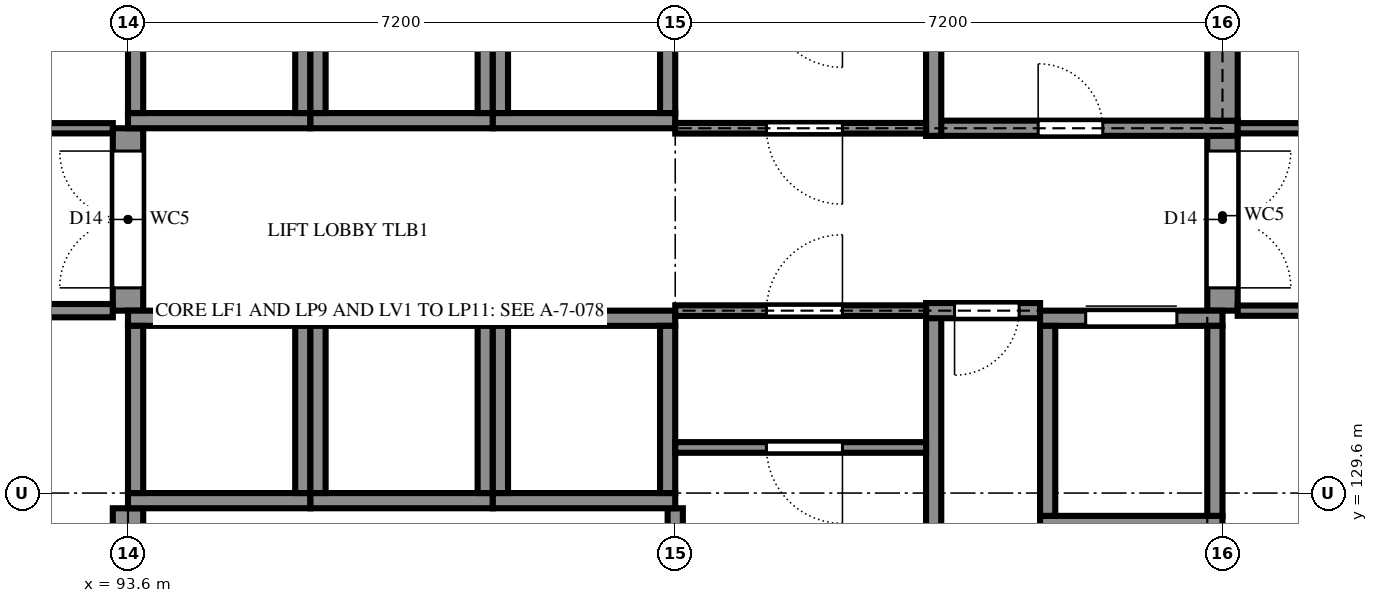
"""IFC4 building model, lengths in metres.
Left out: names, types, materials, properties, quantities, classifications, styles, units other than length and angle.
Written with IfcOpenShell. Run it as: python <this file> out.ifc"""

import sys

from ifc_helpers import new_model, si_unit, direction, frame, frame_2d, origin, place, context, subcontext, project, spatial, rectangle, extrude, element, fill, save


model = new_model("IFC4")
c1 = context("Model", 3, precision=1e-05, world=origin(), true_north=direction((0.0, 1.0)))
c2 = subcontext(c1, "Body", "Model", "MODEL_VIEW")
j1 = project(units=[si_unit("LENGTHUNIT", "METRE"), si_unit("PLANEANGLEUNIT", "RADIAN")], contexts=[c1])
p1 = place(None, origin())
s1 = spatial("IfcSite", under=j1, at=p1, CompositionType="ELEMENT")
p2 = place(p1, origin())
s2 = spatial("IfcBuilding", under=s1, at=p2, CompositionType="ELEMENT")
p3 = place(p2, frame((0.0, 0.0, 3.6)))
s3 = spatial("IfcBuildingStorey", under=s2, at=p3, CompositionType="ELEMENT", Elevation=3.6)
p4 = place(p3, frame((100.8, 128.575, 0.0), z_axis=(0.0, 0.0, 1.0), x_axis=(0.0, 1.0, 0.0)))
e1 = element("IfcWall", 1, at=p4, inside=s3, PredefinedType="SHEAR", context=c2, shape_type="SweptSolid", body=[
    extrude(rectangle(XDim=0.825, YDim=0.2, at=frame_2d((0.413, 0.0))), origin(), (0.0, 0.0, 1.0), 3.6),
])
p5 = place(p3, frame((93.6, 129.4, 0.0), z_axis=(0.0, 0.0, 1.0), x_axis=(0.0, -1.0, 0.0)))
e2 = element("IfcWall", 2, at=p5, inside=s3, PredefinedType="SHEAR", context=c2, shape_type="SweptSolid", body=[
    extrude(rectangle(XDim=7.1, YDim=0.4, at=frame_2d((3.55, 0.0))), origin(), (0.0, 0.0, 1.0), 3.6),
])
p6 = place(p3, frame((93.6, 132.0, 0.0), z_axis=(0.0, 0.0, 1.0), x_axis=(0.0, 1.0, 0.0)))
e3 = element("IfcWall", 3, at=p6, inside=s3, PredefinedType="SHEAR", context=c2, shape_type="SweptSolid", body=[
    extrude(rectangle(XDim=2.4, YDim=0.4, at=frame_2d((1.2, 0.0))), origin(), (0.0, 0.0, 1.0), 3.6),
])
p7 = place(p6, frame((0.3, 0.0, 0.0)))
e4 = element("IfcOpeningElement", 4, at=p7, cuts=e3, PredefinedType="OPENING", context=c2, shape_type="SweptSolid", body=[
    extrude(rectangle(XDim=1.8, YDim=2.1, at=frame_2d((0.9, 1.05))), frame((0.0, 0.21, 0.0), z_axis=(0.0, -1.0, 0.0), x_axis=(1.0, 0.0, 0.0)), (0.0, 0.0, 1.0), 0.42),
])
p8 = place(p3, frame((104.2, 132.1, 0.0), z_axis=(0.0, 0.0, 1.0), x_axis=(0.0, -1.0, 0.0)))
e5 = element("IfcWall", 5, at=p8, inside=s3, PredefinedType="SHEAR", context=c2, shape_type="SweptSolid", body=[
    extrude(rectangle(XDim=3.525, YDim=0.2, at=frame_2d((1.763, 0.0))), origin(), (0.0, 0.0, 1.0), 3.6),
])
p9 = place(p3, frame((105.6, 132.0, 0.0), z_axis=(0.0, 0.0, 1.0), x_axis=(-1.0, 0.0, 0.0)))
e6 = element("IfcWall", 6, at=p9, inside=s3, PredefinedType="SHEAR", context=c2, shape_type="SweptSolid", body=[
    extrude(rectangle(XDim=1.5, YDim=0.2, at=frame_2d((0.75, 0.0))), origin(), (0.0, 0.0, 1.0), 3.6),
])
p10 = place(p9, frame((0.275, 0.0, 0.0)))
e7 = element("IfcOpeningElement", 7, at=p10, cuts=e6, PredefinedType="OPENING", context=c2, shape_type="SweptSolid", body=[
    extrude(rectangle(XDim=0.85, YDim=2.1, at=frame_2d((0.425, 1.05))), frame((0.0, 0.11, 0.0), z_axis=(0.0, -1.0, 0.0), x_axis=(1.0, 0.0, 0.0)), (0.0, 0.0, 1.0), 0.22),
])
p11 = place(p3, frame((108.0, 132.0, 0.0), z_axis=(0.0, 0.0, 1.0), x_axis=(0.0, 1.0, 0.0)))
e8 = element("IfcWall", 8, at=p11, inside=s3, PredefinedType="SHEAR", context=c2, shape_type="SweptSolid", body=[
    extrude(rectangle(XDim=2.5, YDim=0.4, at=frame_2d((1.25, 0.0))), origin(), (0.0, 0.0, 1.0), 3.6),
])
p12 = place(p11, frame((0.3, 0.0, 0.0)))
e9 = element("IfcOpeningElement", 9, at=p12, cuts=e8, PredefinedType="OPENING", context=c2, shape_type="SweptSolid", body=[
    extrude(rectangle(XDim=1.8, YDim=2.1, at=frame_2d((0.9, 1.05))), frame((0.0, 0.21, 0.0), z_axis=(0.0, -1.0, 0.0), x_axis=(1.0, 0.0, 0.0)), (0.0, 0.0, 1.0), 0.42),
])
p13 = place(p3, frame((104.1, 134.4, 0.0), z_axis=(0.0, 0.0, 1.0), x_axis=(1.0, 0.0, 0.0)))
e10 = element("IfcWall", 10, at=p13, inside=s3, PredefinedType="SHEAR", context=c2, shape_type="SweptSolid", body=[
    extrude(rectangle(XDim=4.1, YDim=0.2, at=frame_2d((2.05, 0.0))), origin(), (0.0, 0.0, 1.0), 3.6),
])
p14 = place(p13, frame((1.475, 0.0, 0.0)))
e11 = element("IfcOpeningElement", 11, at=p14, cuts=e10, PredefinedType="OPENING", context=c2, shape_type="SweptSolid", body=[
    extrude(rectangle(XDim=0.85, YDim=2.1, at=frame_2d((0.425, 1.05))), frame((0.0, 0.11, 0.0), z_axis=(0.0, -1.0, 0.0), x_axis=(1.0, 0.0, 0.0)), (0.0, 0.0, 1.0), 0.22),
])
p15 = place(p3, frame((108.0, 134.5, 0.0), z_axis=(0.0, 0.0, 1.0), x_axis=(0.0, 1.0, 0.0)))
e12 = element("IfcWall", 12, at=p15, inside=s3, PredefinedType="SHEAR", context=c2, shape_type="SweptSolid", body=[
    extrude(rectangle(XDim=2.9, YDim=0.4, at=frame_2d((1.45, 0.0))), origin(), (0.0, 0.0, 1.0), 3.6),
])
p16 = place(p3, frame((104.2, 137.4, 0.0), z_axis=(0.0, 0.0, 1.0), x_axis=(0.0, -1.0, 0.0)))
e13 = element("IfcWall", 13, at=p16, inside=s3, PredefinedType="SHEAR", context=c2, shape_type="SweptSolid", body=[
    extrude(rectangle(XDim=3.1, YDim=0.2, at=frame_2d((1.55, 0.0))), origin(), (0.0, 0.0, 1.0), 3.6),
])
for number, where, z_axis, x_axis in (
    (14, (93.6, 129.5, 0.0), (0.0, 0.0, 1.0), (1.0, 0.0, 0.0)),
    (15, (93.6, 131.9, 0.0), (0.0, 0.0, 1.0), (1.0, 0.0, 0.0)),
):
    element("IfcWall", number, at=place(p3, frame(where, z_axis=z_axis, x_axis=x_axis)), inside=s3, PredefinedType="SHEAR", context=c2, shape_type="SweptSolid", body=[
        extrude(rectangle(XDim=2.4, YDim=0.2, at=frame_2d((1.2, 0.0))), origin(), (0.0, 0.0, 1.0), 3.6),
    ])
for number, where, z_axis, x_axis in (
    (16, (93.7, 129.6, 0.0), (0.0, 0.0, 1.0), (0.0, 1.0, 0.0)),
    (17, (95.9, 129.6, 0.0), (0.0, 0.0, 1.0), (0.0, 1.0, 0.0)),
):
    element("IfcWall", number, at=place(p3, frame(where, z_axis=z_axis, x_axis=x_axis)), inside=s3, PredefinedType="SHEAR", context=c2, shape_type="SweptSolid", body=[
        extrude(rectangle(XDim=2.2, YDim=0.2, at=frame_2d((1.1, 0.0))), origin(), (0.0, 0.0, 1.0), 3.6),
    ])
for number, where, z_axis, x_axis in (
    (18, (96.0, 129.5, 0.0), (0.0, 0.0, 1.0), (1.0, 0.0, 0.0)),
    (19, (96.0, 131.9, 0.0), (0.0, 0.0, 1.0), (1.0, 0.0, 0.0)),
):
    element("IfcWall", number, at=place(p3, frame(where, z_axis=z_axis, x_axis=x_axis)), inside=s3, PredefinedType="SHEAR", context=c2, shape_type="SweptSolid", body=[
        extrude(rectangle(XDim=2.4, YDim=0.2, at=frame_2d((1.2, 0.0))), origin(), (0.0, 0.0, 1.0), 3.6),
    ])
for number, where, z_axis, x_axis in (
    (20, (96.1, 129.6, 0.0), (0.0, 0.0, 1.0), (0.0, 1.0, 0.0)),
    (21, (98.3, 129.6, 0.0), (0.0, 0.0, 1.0), (0.0, 1.0, 0.0)),
):
    element("IfcWall", number, at=place(p3, frame(where, z_axis=z_axis, x_axis=x_axis)), inside=s3, PredefinedType="SHEAR", context=c2, shape_type="SweptSolid", body=[
        extrude(rectangle(XDim=2.2, YDim=0.2, at=frame_2d((1.1, 0.0))), origin(), (0.0, 0.0, 1.0), 3.6),
    ])
for number, where, z_axis, x_axis in (
    (22, (98.4, 129.5, 0.0), (0.0, 0.0, 1.0), (1.0, 0.0, 0.0)),
    (23, (98.4, 131.9, 0.0), (0.0, 0.0, 1.0), (1.0, 0.0, 0.0)),
):
    element("IfcWall", number, at=place(p3, frame(where, z_axis=z_axis, x_axis=x_axis)), inside=s3, PredefinedType="SHEAR", context=c2, shape_type="SweptSolid", body=[
        extrude(rectangle(XDim=2.4, YDim=0.2, at=frame_2d((1.2, 0.0))), origin(), (0.0, 0.0, 1.0), 3.6),
    ])
for number, where, z_axis, x_axis in (
    (24, (98.5, 129.6, 0.0), (0.0, 0.0, 1.0), (0.0, 1.0, 0.0)),
    (25, (100.7, 129.6, 0.0), (0.0, 0.0, 1.0), (0.0, 1.0, 0.0)),
):
    element("IfcWall", number, at=place(p3, frame(where, z_axis=z_axis, x_axis=x_axis)), inside=s3, PredefinedType="SHEAR", context=c2, shape_type="SweptSolid", body=[
        extrude(rectangle(XDim=2.2, YDim=0.2, at=frame_2d((1.1, 0.0))), origin(), (0.0, 0.0, 1.0), 3.6),
    ])
p17 = place(p3, frame((93.6, 134.5, 0.0), z_axis=(0.0, 0.0, 1.0), x_axis=(1.0, 0.0, 0.0)))
e26 = element("IfcWall", 26, at=p17, inside=s3, PredefinedType="SHEAR", context=c2, shape_type="SweptSolid", body=[
    extrude(rectangle(XDim=2.4, YDim=0.2, at=frame_2d((1.2, 0.0))), origin(), (0.0, 0.0, 1.0), 3.6),
])
for number, where, z_axis, x_axis in (
    (27, (93.7, 134.6, 0.0), (0.0, 0.0, 1.0), (0.0, 1.0, 0.0)),
    (28, (95.9, 134.6, 0.0), (0.0, 0.0, 1.0), (0.0, 1.0, 0.0)),
):
    element("IfcWall", number, at=place(p3, frame(where, z_axis=z_axis, x_axis=x_axis)), inside=s3, PredefinedType="SHEAR", context=c2, shape_type="SweptSolid", body=[
        extrude(rectangle(XDim=2.2, YDim=0.2, at=frame_2d((1.1, 0.0))), origin(), (0.0, 0.0, 1.0), 3.6),
    ])
p18 = place(p3, frame((96.0, 134.5, 0.0), z_axis=(0.0, 0.0, 1.0), x_axis=(1.0, 0.0, 0.0)))
e29 = element("IfcWall", 29, at=p18, inside=s3, PredefinedType="SHEAR", context=c2, shape_type="SweptSolid", body=[
    extrude(rectangle(XDim=2.4, YDim=0.2, at=frame_2d((1.2, 0.0))), origin(), (0.0, 0.0, 1.0), 3.6),
])
for number, where, z_axis, x_axis in (
    (30, (96.1, 134.6, 0.0), (0.0, 0.0, 1.0), (0.0, 1.0, 0.0)),
    (31, (98.3, 134.6, 0.0), (0.0, 0.0, 1.0), (0.0, 1.0, 0.0)),
):
    element("IfcWall", number, at=place(p3, frame(where, z_axis=z_axis, x_axis=x_axis)), inside=s3, PredefinedType="SHEAR", context=c2, shape_type="SweptSolid", body=[
        extrude(rectangle(XDim=2.2, YDim=0.2, at=frame_2d((1.1, 0.0))), origin(), (0.0, 0.0, 1.0), 3.6),
    ])
p19 = place(p3, frame((98.4, 134.5, 0.0), z_axis=(0.0, 0.0, 1.0), x_axis=(1.0, 0.0, 0.0)))
e32 = element("IfcWall", 32, at=p19, inside=s3, PredefinedType="SHEAR", context=c2, shape_type="SweptSolid", body=[
    extrude(rectangle(XDim=2.4, YDim=0.2, at=frame_2d((1.2, 0.0))), origin(), (0.0, 0.0, 1.0), 3.6),
])
for number, where, z_axis, x_axis in (
    (33, (98.5, 134.6, 0.0), (0.0, 0.0, 1.0), (0.0, 1.0, 0.0)),
    (34, (100.7, 134.6, 0.0), (0.0, 0.0, 1.0), (0.0, 1.0, 0.0)),
):
    element("IfcWall", number, at=place(p3, frame(where, z_axis=z_axis, x_axis=x_axis)), inside=s3, PredefinedType="SHEAR", context=c2, shape_type="SweptSolid", body=[
        extrude(rectangle(XDim=2.2, YDim=0.2, at=frame_2d((1.1, 0.0))), origin(), (0.0, 0.0, 1.0), 3.6),
    ])
p20 = place(p3, frame((105.6, 129.2, 0.0), z_axis=(0.0, 0.0, 1.0), x_axis=(1.0, 0.0, 0.0)))
e35 = element("IfcWall", 35, at=p20, inside=s3, PredefinedType="SHEAR", context=c2, shape_type="SweptSolid", body=[
    extrude(rectangle(XDim=2.4, YDim=0.2, at=frame_2d((1.2, 0.0))), origin(), (0.0, 0.0, 1.0), 3.6),
])
p21 = place(p3, frame((105.6, 131.9, 0.0), z_axis=(0.0, 0.0, 1.0), x_axis=(1.0, 0.0, 0.0)))
e36 = element("IfcWall", 36, at=p21, inside=s3, PredefinedType="SHEAR", context=c2, shape_type="SweptSolid", body=[
    extrude(rectangle(XDim=2.4, YDim=0.2, at=frame_2d((1.2, 0.0))), origin(), (0.0, 0.0, 1.0), 3.6),
])
p22 = place(p21, frame((0.6, 0.0, 0.0)))
e37 = element("IfcOpeningElement", 37, at=p22, cuts=e36, PredefinedType="OPENING", context=c2, shape_type="SweptSolid", body=[
    extrude(rectangle(XDim=1.2, YDim=2.1, at=frame_2d((0.6, 1.05))), frame((0.0, 0.11, 0.0), z_axis=(0.0, -1.0, 0.0), x_axis=(1.0, 0.0, 0.0)), (0.0, 0.0, 1.0), 0.22),
])
for number, where, z_axis, x_axis in (
    (38, (105.7, 129.3, 0.0), (0.0, 0.0, 1.0), (0.0, 1.0, 0.0)),
    (39, (107.9, 129.3, 0.0), (0.0, 0.0, 1.0), (0.0, 1.0, 0.0)),
):
    element("IfcWall", number, at=place(p3, frame(where, z_axis=z_axis, x_axis=x_axis)), inside=s3, PredefinedType="SHEAR", context=c2, shape_type="SweptSolid", body=[
        extrude(rectangle(XDim=2.5, YDim=0.2, at=frame_2d((1.25, 0.0))), origin(), (0.0, 0.0, 1.0), 3.6),
    ])
p23 = place(p3, frame((100.8, 130.2, 0.0), z_axis=(0.0, 0.0, 1.0), x_axis=(1.0, 0.0, 0.0)))
e40 = element("IfcWall", 40, at=p23, inside=s3, PredefinedType="PARTITIONING", context=c2, shape_type="SweptSolid", body=[
    extrude(rectangle(XDim=3.3, YDim=0.14, at=frame_2d((1.65, 0.0))), origin(), (0.0, 0.0, 1.0), 3.42),
])
p24 = place(p23, frame((1.2, 0.0, 0.0)))
e41 = element("IfcOpeningElement", 41, at=p24, cuts=e40, PredefinedType="OPENING", context=c2, shape_type="SweptSolid", body=[
    extrude(rectangle(XDim=1.0, YDim=2.1, at=frame_2d((0.5, 1.05))), frame((0.0, 0.08, 0.0), z_axis=(0.0, -1.0, 0.0), x_axis=(1.0, 0.0, 0.0)), (0.0, 0.0, 1.0), 0.16),
])
p25 = place(p3, frame((74.143, 132.0, 0.0), z_axis=(0.0, 0.0, 1.0), x_axis=(1.0, 0.0, 0.0)))
e42 = element("IfcWall", 42, at=p25, inside=s3, PredefinedType="PARTITIONING", context=c2, shape_type="SweptSolid", body=[
    extrude(rectangle(XDim=19.257, YDim=0.175, at=frame_2d((9.629, 0.0))), origin(), (0.0, 0.0, 1.0), 3.12),
])
p26 = place(p25, frame((9.357, 0.0, 0.0)))
e43 = element("IfcOpeningElement", 43, at=p26, cuts=e42, PredefinedType="OPENING", context=c2, shape_type="SweptSolid", body=[
    extrude(rectangle(XDim=1.0, YDim=2.4, at=frame_2d((0.5, 1.2))), frame((0.0, 0.097, 0.0), z_axis=(0.0, -1.0, 0.0), x_axis=(1.0, 0.0, 0.0)), (0.0, 0.0, 1.0), 0.195),
])
p27 = place(p3, frame((100.8, 132.0, 0.0), z_axis=(0.0, 0.0, 1.0), x_axis=(1.0, 0.0, 0.0)))
e44 = element("IfcWall", 44, at=p27, inside=s3, PredefinedType="PARTITIONING", context=c2, shape_type="SweptSolid", body=[
    extrude(rectangle(XDim=3.3, YDim=0.14, at=frame_2d((1.65, 0.0))), origin(), (0.0, 0.0, 1.0), 3.42),
])
p28 = place(p27, frame((1.2, 0.0, 0.0)))
e45 = element("IfcOpeningElement", 45, at=p28, cuts=e44, PredefinedType="OPENING", context=c2, shape_type="SweptSolid", body=[
    extrude(rectangle(XDim=1.0, YDim=2.1, at=frame_2d((0.5, 1.05))), frame((0.0, 0.08, 0.0), z_axis=(0.0, -1.0, 0.0), x_axis=(1.0, 0.0, 0.0)), (0.0, 0.0, 1.0), 0.16),
])
p29 = place(p3, frame((108.2, 132.0, 0.0), z_axis=(0.0, 0.0, 1.0), x_axis=(1.0, 0.0, 0.0)))
e46 = element("IfcWall", 46, at=p29, inside=s3, PredefinedType="PARTITIONING", context=c2, shape_type="SweptSolid", body=[
    extrude(rectangle(XDim=28.45, YDim=0.135, at=frame_2d((14.225, 0.0))), origin(), (0.0, 0.0, 1.0), 3.12),
])
p30 = place(p29, frame((5.3, 0.0, 0.0)))
e47 = element("IfcOpeningElement", 47, at=p30, cuts=e46, PredefinedType="OPENING", context=c2, shape_type="SweptSolid", body=[
    extrude(rectangle(XDim=1.0, YDim=2.4, at=frame_2d((0.5, 1.2))), frame((0.0, 0.077, 0.0), z_axis=(0.0, -1.0, 0.0), x_axis=(1.0, 0.0, 0.0)), (0.0, 0.0, 1.0), 0.155),
])
p31 = place(p29, frame((19.3, 0.0, 0.0)))
e48 = element("IfcOpeningElement", 48, at=p31, cuts=e46, PredefinedType="OPENING", context=c2, shape_type="SweptSolid", body=[
    extrude(rectangle(XDim=1.0, YDim=2.4, at=frame_2d((0.5, 1.2))), frame((0.0, 0.077, 0.0), z_axis=(0.0, -1.0, 0.0), x_axis=(1.0, 0.0, 0.0)), (0.0, 0.0, 1.0), 0.155),
])
p32 = place(p3, frame((64.95, 134.4, 0.0), z_axis=(0.0, 0.0, 1.0), x_axis=(1.0, 0.0, 0.0)))
e49 = element("IfcWall", 49, at=p32, inside=s3, PredefinedType="PARTITIONING", context=c2, shape_type="SweptSolid", body=[
    extrude(rectangle(XDim=28.45, YDim=0.135, at=frame_2d((14.225, 0.0))), origin(), (0.0, 0.0, 1.0), 3.12),
])
p33 = place(p32, frame((1.225, 0.0, 0.0)))
e50 = element("IfcOpeningElement", 50, at=p33, cuts=e49, PredefinedType="OPENING", context=c2, shape_type="SweptSolid", body=[
    extrude(rectangle(XDim=0.85, YDim=2.1, at=frame_2d((0.425, 1.05))), frame((0.0, 0.077, 0.0), z_axis=(0.0, -1.0, 0.0), x_axis=(1.0, 0.0, 0.0)), (0.0, 0.0, 1.0), 0.155),
])
p34 = place(p32, frame((9.75, 0.0, 0.0)))
e51 = element("IfcOpeningElement", 51, at=p34, cuts=e49, PredefinedType="OPENING", context=c2, shape_type="SweptSolid", body=[
    extrude(rectangle(XDim=1.8, YDim=2.1, at=frame_2d((0.9, 1.05))), frame((0.0, 0.077, 0.0), z_axis=(0.0, -1.0, 0.0), x_axis=(1.0, 0.0, 0.0)), (0.0, 0.0, 1.0), 0.155),
])
p35 = place(p32, frame((16.95, 0.0, 0.0)))
e52 = element("IfcOpeningElement", 52, at=p35, cuts=e49, PredefinedType="OPENING", context=c2, shape_type="SweptSolid", body=[
    extrude(rectangle(XDim=1.8, YDim=2.1, at=frame_2d((0.9, 1.05))), frame((0.0, 0.077, 0.0), z_axis=(0.0, -1.0, 0.0), x_axis=(1.0, 0.0, 0.0)), (0.0, 0.0, 1.0), 0.155),
])
p36 = place(p32, frame((24.15, 0.0, 0.0)))
e53 = element("IfcOpeningElement", 53, at=p36, cuts=e49, PredefinedType="OPENING", context=c2, shape_type="SweptSolid", body=[
    extrude(rectangle(XDim=1.8, YDim=2.1, at=frame_2d((0.9, 1.05))), frame((0.0, 0.077, 0.0), z_axis=(0.0, -1.0, 0.0), x_axis=(1.0, 0.0, 0.0)), (0.0, 0.0, 1.0), 0.155),
])
p37 = place(p3, frame((100.8, 134.4, 0.0), z_axis=(0.0, 0.0, 1.0), x_axis=(1.0, 0.0, 0.0)))
e54 = element("IfcWall", 54, at=p37, inside=s3, PredefinedType="PARTITIONING", context=c2, shape_type="SweptSolid", body=[
    extrude(rectangle(XDim=3.3, YDim=0.14, at=frame_2d((1.65, 0.0))), origin(), (0.0, 0.0, 1.0), 3.42),
])
p38 = place(p37, frame((1.2, 0.0, 0.0)))
e55 = element("IfcOpeningElement", 55, at=p38, cuts=e54, PredefinedType="OPENING", context=c2, shape_type="SweptSolid", body=[
    extrude(rectangle(XDim=1.0, YDim=2.1, at=frame_2d((0.5, 1.05))), frame((0.0, 0.08, 0.0), z_axis=(0.0, -1.0, 0.0), x_axis=(1.0, 0.0, 0.0)), (0.0, 0.0, 1.0), 0.16),
])
p39 = place(p3, frame((108.2, 134.4, 0.0), z_axis=(0.0, 0.0, 1.0), x_axis=(1.0, 0.0, 0.0)))
e56 = element("IfcWall", 56, at=p39, inside=s3, PredefinedType="PARTITIONING", context=c2, shape_type="SweptSolid", body=[
    extrude(rectangle(XDim=28.45, YDim=0.135, at=frame_2d((14.225, 0.0))), origin(), (0.0, 0.0, 1.0), 3.12),
])
p40 = place(p39, frame((2.9, 0.0, 0.0)))
e57 = element("IfcOpeningElement", 57, at=p40, cuts=e56, PredefinedType="OPENING", context=c2, shape_type="SweptSolid", body=[
    extrude(rectangle(XDim=1.0, YDim=2.4, at=frame_2d((0.5, 1.2))), frame((0.0, 0.077, 0.0), z_axis=(0.0, -1.0, 0.0), x_axis=(1.0, 0.0, 0.0)), (0.0, 0.0, 1.0), 0.155),
])
p41 = place(p39, frame((10.1, 0.0, 0.0)))
e58 = element("IfcOpeningElement", 58, at=p41, cuts=e56, PredefinedType="OPENING", context=c2, shape_type="SweptSolid", body=[
    extrude(rectangle(XDim=1.0, YDim=2.4, at=frame_2d((0.5, 1.2))), frame((0.0, 0.077, 0.0), z_axis=(0.0, -1.0, 0.0), x_axis=(1.0, 0.0, 0.0)), (0.0, 0.0, 1.0), 0.155),
])
p42 = place(p39, frame((17.3, 0.0, 0.0)))
e59 = element("IfcOpeningElement", 59, at=p42, cuts=e56, PredefinedType="OPENING", context=c2, shape_type="SweptSolid", body=[
    extrude(rectangle(XDim=1.0, YDim=2.4, at=frame_2d((0.5, 1.2))), frame((0.0, 0.077, 0.0), z_axis=(0.0, -1.0, 0.0), x_axis=(1.0, 0.0, 0.0)), (0.0, 0.0, 1.0), 0.155),
])
p43 = place(p22, origin())
e60 = element("IfcDoor", 60, at=p43, inside=s3, OperationType="SLIDING_TO_LEFT", PredefinedType="DOOR", context=c2, shape_type="SweptSolid", body=[
    extrude(rectangle(XDim=1.2, YDim=2.1, at=frame_2d((0.6, 1.05))), frame((0.0, 0.025, 0.0), z_axis=(0.0, -1.0, 0.0), x_axis=(1.0, 0.0, 0.0)), (0.0, 0.0, 1.0), 0.05),
])
fill(e37, e60)
p44 = place(p24, frame((1.0, 0.0, 0.0), z_axis=(0.0, 0.0, 1.0), x_axis=(-1.0, 0.0, 0.0)))
e61 = element("IfcDoor", 61, at=p44, inside=s3, OperationType="SINGLE_SWING_RIGHT", PredefinedType="DOOR", context=c2, shape_type="SweptSolid", body=[
    extrude(rectangle(XDim=1.0, YDim=2.1, at=frame_2d((0.5, 1.05))), frame((0.0, 0.025, 0.0), z_axis=(0.0, -1.0, 0.0), x_axis=(1.0, 0.0, 0.0)), (0.0, 0.0, 1.0), 0.05),
])
fill(e41, e61)
p45 = place(p28, origin())
e62 = element("IfcDoor", 62, at=p45, inside=s3, OperationType="SINGLE_SWING_LEFT", PredefinedType="DOOR", context=c2, shape_type="SweptSolid", body=[
    extrude(rectangle(XDim=1.0, YDim=2.1, at=frame_2d((0.5, 1.05))), frame((0.0, 0.025, 0.0), z_axis=(0.0, -1.0, 0.0), x_axis=(1.0, 0.0, 0.0)), (0.0, 0.0, 1.0), 0.05),
])
fill(e45, e62)
p46 = place(p38, frame((1.0, 0.0, 0.0), z_axis=(0.0, 0.0, 1.0), x_axis=(-1.0, 0.0, 0.0)))
e63 = element("IfcDoor", 63, at=p46, inside=s3, OperationType="SINGLE_SWING_RIGHT", PredefinedType="DOOR", context=c2, shape_type="SweptSolid", body=[
    extrude(rectangle(XDim=1.0, YDim=2.1, at=frame_2d((0.5, 1.05))), frame((0.0, 0.025, 0.0), z_axis=(0.0, -1.0, 0.0), x_axis=(1.0, 0.0, 0.0)), (0.0, 0.0, 1.0), 0.05),
])
fill(e55, e63)
p47 = place(p10, origin())
e64 = element("IfcDoor", 64, at=p47, inside=s3, OperationType="SINGLE_SWING_LEFT", PredefinedType="DOOR", context=c2, shape_type="SweptSolid", body=[
    extrude(rectangle(XDim=0.85, YDim=2.1, at=frame_2d((0.425, 1.05))), frame((0.0, 0.025, 0.0), z_axis=(0.0, -1.0, 0.0), x_axis=(1.0, 0.0, 0.0)), (0.0, 0.0, 1.0), 0.05),
])
fill(e7, e64)
p48 = place(p14, origin())
e65 = element("IfcDoor", 65, at=p48, inside=s3, OperationType="SINGLE_SWING_RIGHT", PredefinedType="DOOR", context=c2, shape_type="SweptSolid", body=[
    extrude(rectangle(XDim=0.85, YDim=2.1, at=frame_2d((0.425, 1.05))), frame((0.0, 0.025, 0.0), z_axis=(0.0, -1.0, 0.0), x_axis=(1.0, 0.0, 0.0)), (0.0, 0.0, 1.0), 0.05),
])
fill(e11, e65)
p49 = place(p7, origin())
e66 = element("IfcDoor", 66, at=p49, inside=s3, OperationType="DOUBLE_DOOR_SINGLE_SWING", PredefinedType="DOOR", context=c2, shape_type="SweptSolid", body=[
    extrude(rectangle(XDim=1.8, YDim=2.1, at=frame_2d((0.9, 1.05))), frame((0.0, 0.025, 0.0), z_axis=(0.0, -1.0, 0.0), x_axis=(1.0, 0.0, 0.0)), (0.0, 0.0, 1.0), 0.05),
])
fill(e4, e66)
p50 = place(p12, frame((1.8, 0.0, 0.0), z_axis=(0.0, 0.0, 1.0), x_axis=(-1.0, 0.0, 0.0)))
e67 = element("IfcDoor", 67, at=p50, inside=s3, OperationType="DOUBLE_DOOR_SINGLE_SWING", PredefinedType="DOOR", context=c2, shape_type="SweptSolid", body=[
    extrude(rectangle(XDim=1.8, YDim=2.1, at=frame_2d((0.9, 1.05))), frame((0.0, 0.025, 0.0), z_axis=(0.0, -1.0, 0.0), x_axis=(1.0, 0.0, 0.0)), (0.0, 0.0, 1.0), 0.05),
])
fill(e9, e67)
save(model, sys.argv[1])
